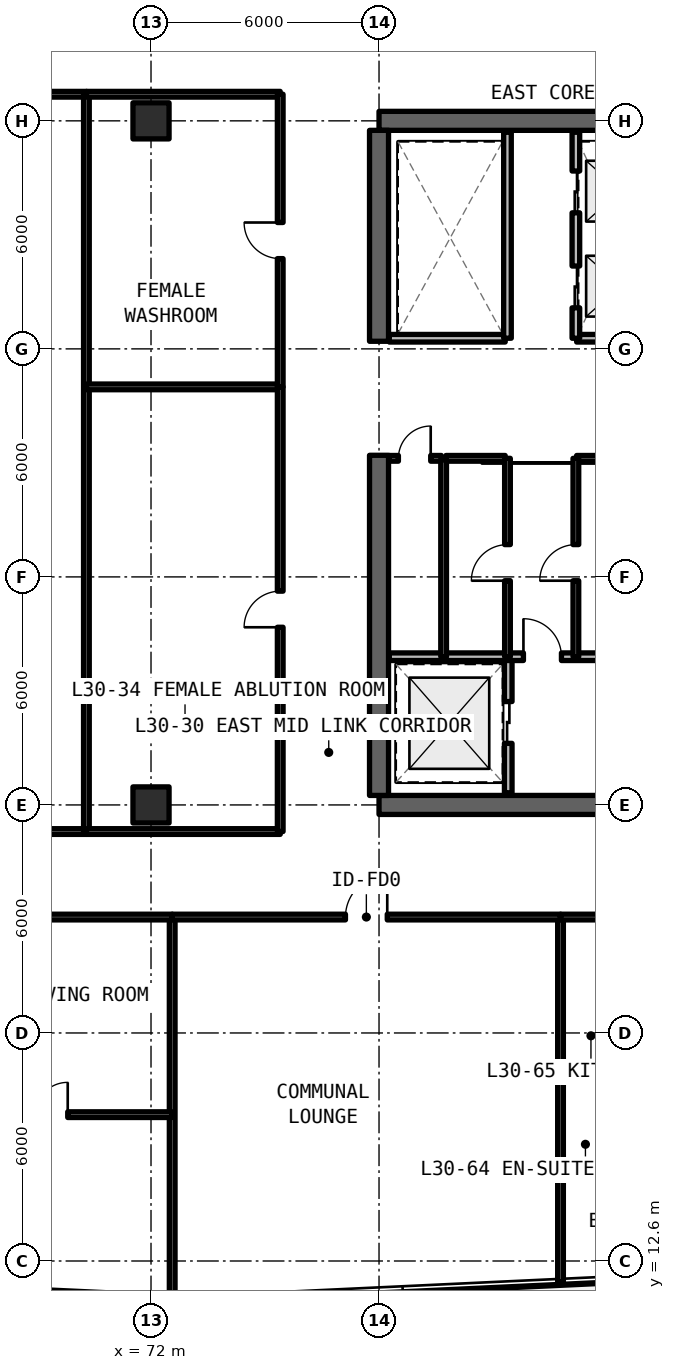
"""IFC4 building model, lengths in metres.
Left out: names, types, materials, properties, quantities, classifications, styles, units other than length and angle.
Written with IfcOpenShell. Run it as: python <this file> out.ifc"""

import sys

from ifc_helpers import new_model, si_unit, direction, frame, frame_2d, origin, origin_2d, place, context, subcontext, project, spatial, rectangle, extrude, element, fill, save


model = new_model("IFC4")
c1 = context("Model", 3, precision=1e-05, world=origin(), true_north=direction((0.0, 1.0)))
c2 = subcontext(c1, "Body", "Model", "MODEL_VIEW")
j1 = project(units=[si_unit("LENGTHUNIT", "METRE"), si_unit("PLANEANGLEUNIT", "RADIAN")], contexts=[c1])
p1 = place(None, origin())
s1 = spatial("IfcSite", under=j1, at=p1, CompositionType="ELEMENT")
p2 = place(p1, origin())
s2 = spatial("IfcBuilding", under=s1, at=p2, CompositionType="ELEMENT")
p3 = place(p2, frame((0.0, 0.0, 108.57)))
s3 = spatial("IfcBuildingStorey", under=s2, at=p3, CompositionType="ELEMENT", Elevation=108.57)
for number, where, z_axis, x_axis in (
    (1, (78.0, 24.6, 0.0), (0.0, 0.0, 1.0), (1.0, 0.0, 0.0)),
    (2, (90.0, 42.6, 0.0), (0.0, 0.0, 1.0), (-1.0, 0.0, 0.0)),
):
    element("IfcWall", number, at=place(p3, frame(where, z_axis=z_axis, x_axis=x_axis)), inside=s3, PredefinedType="SHEAR", context=c2, shape_type="SweptSolid", body=[
        extrude(rectangle(XDim=12.0, YDim=0.5, at=frame_2d((6.0, 0.0))), origin(), (0.0, 0.0, 1.0), 3.63),
    ])
p4 = place(p3, frame((78.0, 24.85, 0.0), z_axis=(0.0, 0.0, 1.0), x_axis=(0.0, 1.0, 0.0)))
e3 = element("IfcWall", 3, at=p4, inside=s3, PredefinedType="SHEAR", context=c2, shape_type="SweptSolid", body=[
    extrude(rectangle(XDim=8.95, YDim=0.5, at=frame_2d((4.475, 0.0))), origin(), (0.0, 0.0, 1.0), 3.63),
])
p5 = place(p3, frame((78.0, 36.8, 0.0), z_axis=(0.0, 0.0, 1.0), x_axis=(0.0, 1.0, 0.0)))
e4 = element("IfcWall", 4, at=p5, inside=s3, PredefinedType="SHEAR", context=c2, shape_type="SweptSolid", body=[
    extrude(rectangle(XDim=5.55, YDim=0.5, at=frame_2d((2.775, 0.0))), origin(), (0.0, 0.0, 1.0), 3.63),
])
for number, where, z_axis, x_axis in (
    (5, (72.0, 24.6, 0.0), (0.0, 0.0, 1.0), (1.0, 0.0, 0.0)),
    (6, (72.0, 42.6, 0.0), (0.0, 0.0, 1.0), (1.0, 0.0, 0.0)),
):
    element("IfcColumn", number, at=place(p3, frame(where, z_axis=z_axis, x_axis=x_axis)), inside=s3, PredefinedType="COLUMN", context=c2, shape_type="SweptSolid", body=[
        extrude(rectangle(XDim=0.95, YDim=0.95, at=origin_2d()), origin(), (0.0, 0.0, 1.0), 3.63),
    ])
p6 = place(p3, frame((81.4, 24.92, 0.0), z_axis=(0.0, 0.0, 1.0), x_axis=(0.0, 1.0, 0.0)))
e7 = element("IfcWall", 7, at=p6, inside=s3, PredefinedType="SOLIDWALL", context=c2, shape_type="SweptSolid", body=[
    extrude(rectangle(XDim=3.58, YDim=0.2, at=frame_2d((1.79, 0.0))), origin(), (0.0, 0.0, 1.0), 2.63),
])
p7 = place(p6, frame((1.3, 0.0, 0.0)))
e8 = element("IfcOpeningElement", 8, at=p7, cuts=e7, PredefinedType="OPENING", context=c2, shape_type="SweptSolid", body=[
    extrude(rectangle(XDim=1.1, YDim=2.2, at=frame_2d((0.55, 1.1))), frame((0.0, 0.11, 0.0), z_axis=(0.0, -1.0, 0.0), x_axis=(1.0, 0.0, 0.0)), (0.0, 0.0, 1.0), 0.22),
])
p8 = place(p3, frame((78.27, 28.5, 0.0), z_axis=(0.0, 0.0, 1.0), x_axis=(1.0, 0.0, 0.0)))
e9 = element("IfcWall", 9, at=p8, inside=s3, PredefinedType="SOLIDWALL", context=c2, shape_type="SweptSolid", body=[
    extrude(rectangle(XDim=7.51, YDim=0.2, at=frame_2d((3.755, 0.0))), origin(), (0.0, 0.0, 1.0), 2.63),
])
p9 = place(p8, frame((3.53, 0.0, 0.0)))
e10 = element("IfcOpeningElement", 10, at=p9, cuts=e9, PredefinedType="OPENING", context=c2, shape_type="SweptSolid", body=[
    extrude(rectangle(XDim=1.0, YDim=2.15, at=frame_2d((0.5, 1.075))), frame((0.0, 0.11, 0.0), z_axis=(0.0, -1.0, 0.0), x_axis=(1.0, 0.0, 0.0)), (0.0, 0.0, 1.0), 0.22),
])
p10 = place(p3, frame((83.2, 33.72, 0.0), z_axis=(0.0, 0.0, 1.0), x_axis=(1.0, 0.0, 0.0)))
e11 = element("IfcWall", 11, at=p10, inside=s3, PredefinedType="SOLIDWALL", context=c2, shape_type="SweptSolid", body=[
    extrude(rectangle(XDim=1.22, YDim=0.15, at=frame_2d((0.61, 0.0))), origin(), (0.0, 0.0, 1.0), 2.63),
])
p11 = place(p3, frame((83.18, 28.5, 0.0), z_axis=(0.0, 0.0, 1.0), x_axis=(0.0, 1.0, 0.0)))
e12 = element("IfcWall", 12, at=p11, inside=s3, PredefinedType="SOLIDWALL", context=c2, shape_type="SweptSolid", body=[
    extrude(rectangle(XDim=5.22, YDim=0.15, at=frame_2d((2.61, 0.0))), origin(), (0.0, 0.0, 1.0), 2.63),
])
p12 = place(p11, frame((2.0, 0.0, 0.0)))
e13 = element("IfcOpeningElement", 13, at=p12, cuts=e12, PredefinedType="OPENING", context=c2, shape_type="SweptSolid", body=[
    extrude(rectangle(XDim=0.95, YDim=2.15, at=frame_2d((0.475, 1.075))), frame((0.0, 0.085, 0.0), z_axis=(0.0, -1.0, 0.0), x_axis=(1.0, 0.0, 0.0)), (0.0, 0.0, 1.0), 0.17),
])
p13 = place(p3, frame((79.7, 28.5, 0.0), z_axis=(0.0, 0.0, 1.0), x_axis=(0.0, 1.0, 0.0)))
e14 = element("IfcWall", 14, at=p13, inside=s3, PredefinedType="SOLIDWALL", context=c2, shape_type="SweptSolid", body=[
    extrude(rectangle(XDim=5.22, YDim=0.15, at=frame_2d((2.61, 0.0))), origin(), (0.0, 0.0, 1.0), 2.63),
])
p14 = place(p3, frame((79.76, 33.72, 0.0), z_axis=(0.0, 0.0, 1.0), x_axis=(1.0, 0.0, 0.0)))
e15 = element("IfcWall", 15, at=p14, inside=s3, PredefinedType="SOLIDWALL", context=c2, shape_type="SweptSolid", body=[
    extrude(rectangle(XDim=1.56, YDim=0.15, at=frame_2d((0.78, 0.0))), origin(), (0.0, 0.0, 1.0), 2.63),
])
p15 = place(p3, frame((78.27, 33.72, 0.0), z_axis=(0.0, 0.0, 1.0), x_axis=(1.0, 0.0, 0.0)))
e16 = element("IfcWall", 16, at=p15, inside=s3, PredefinedType="SOLIDWALL", context=c2, shape_type="SweptSolid", body=[
    extrude(rectangle(XDim=1.37, YDim=0.15, at=frame_2d((0.685, 0.0))), origin(), (0.0, 0.0, 1.0), 2.63),
])
p16 = place(p15, frame((0.24, 0.0, 0.0)))
e17 = element("IfcOpeningElement", 17, at=p16, cuts=e16, PredefinedType="OPENING", context=c2, shape_type="SweptSolid", body=[
    extrude(rectangle(XDim=0.85, YDim=2.1, at=frame_2d((0.425, 1.05))), frame((0.0, 0.085, 0.0), z_axis=(0.0, -1.0, 0.0), x_axis=(1.0, 0.0, 0.0)), (0.0, 0.0, 1.0), 0.17),
])
p17 = place(p3, frame((81.38, 28.5, 0.0), z_axis=(0.0, 0.0, 1.0), x_axis=(0.0, 1.0, 0.0)))
e18 = element("IfcWall", 18, at=p17, inside=s3, PredefinedType="SOLIDWALL", context=c2, shape_type="SweptSolid", body=[
    extrude(rectangle(XDim=5.22, YDim=0.15, at=frame_2d((2.61, 0.0))), origin(), (0.0, 0.0, 1.0), 2.63),
])
p18 = place(p17, frame((2.0, 0.0, 0.0)))
e19 = element("IfcOpeningElement", 19, at=p18, cuts=e18, PredefinedType="OPENING", context=c2, shape_type="SweptSolid", body=[
    extrude(rectangle(XDim=0.95, YDim=2.15, at=frame_2d((0.475, 1.075))), frame((0.0, 0.085, 0.0), z_axis=(0.0, -1.0, 0.0), x_axis=(1.0, 0.0, 0.0)), (0.0, 0.0, 1.0), 0.17),
])
p19 = place(p3, frame((83.2, 36.88, 0.0), z_axis=(0.0, 0.0, 1.0), x_axis=(1.0, 0.0, 0.0)))
e20 = element("IfcWall", 20, at=p19, inside=s3, PredefinedType="SOLIDWALL", context=c2, shape_type="SweptSolid", body=[
    extrude(rectangle(XDim=2.58, YDim=0.2, at=frame_2d((1.29, 0.0))), origin(), (0.0, 0.0, 1.0), 2.63),
])
p20 = place(p3, frame((83.18, 36.88, 0.0), z_axis=(0.0, 0.0, 1.0), x_axis=(0.0, 1.0, 0.0)))
e21 = element("IfcWall", 21, at=p20, inside=s3, PredefinedType="SOLIDWALL", context=c2, shape_type="SweptSolid", body=[
    extrude(rectangle(XDim=5.42, YDim=0.2, at=frame_2d((2.71, 0.0))), origin(), (0.0, 0.0, 1.0), 2.63),
])
p21 = place(p20, frame((0.8, 0.0, 0.0)))
e22 = element("IfcOpeningElement", 22, at=p21, cuts=e21, PredefinedType="OPENING", context=c2, shape_type="SweptSolid", body=[
    extrude(rectangle(XDim=1.1, YDim=2.2, at=frame_2d((0.55, 1.1))), frame((0.0, 0.11, 0.0), z_axis=(0.0, -1.0, 0.0), x_axis=(1.0, 0.0, 0.0)), (0.0, 0.0, 1.0), 0.22),
])
p22 = place(p20, frame((3.3, 0.0, 0.0)))
e23 = element("IfcOpeningElement", 23, at=p22, cuts=e21, PredefinedType="OPENING", context=c2, shape_type="SweptSolid", body=[
    extrude(rectangle(XDim=1.1, YDim=2.2, at=frame_2d((0.55, 1.1))), frame((0.0, 0.11, 0.0), z_axis=(0.0, -1.0, 0.0), x_axis=(1.0, 0.0, 0.0)), (0.0, 0.0, 1.0), 0.22),
])
p23 = place(p3, frame((78.27, 36.88, 0.0), z_axis=(0.0, 0.0, 1.0), x_axis=(1.0, 0.0, 0.0)))
e24 = element("IfcWall", 24, at=p23, inside=s3, PredefinedType="SOLIDWALL", context=c2, shape_type="SweptSolid", body=[
    extrude(rectangle(XDim=3.05, YDim=0.2, at=frame_2d((1.525, 0.0))), origin(), (0.0, 0.0, 1.0), 2.63),
])
p24 = place(p3, frame((81.38, 36.88, 0.0), z_axis=(0.0, 0.0, 1.0), x_axis=(0.0, 1.0, 0.0)))
e25 = element("IfcWall", 25, at=p24, inside=s3, PredefinedType="SOLIDWALL", context=c2, shape_type="SweptSolid", body=[
    extrude(rectangle(XDim=5.42, YDim=0.2, at=frame_2d((2.71, 0.0))), origin(), (0.0, 0.0, 1.0), 2.63),
])
p25 = place(p3, frame((42.9, 23.9, 0.0), z_axis=(0.0, 0.0, 1.0), x_axis=(1.0, 0.0, 0.0)))
e26 = element("IfcWall", 26, at=p25, inside=s3, PredefinedType="SOLIDWALL", context=c2, shape_type="SweptSolid", body=[
    extrude(rectangle(XDim=27.4, YDim=0.15, at=frame_2d((13.7, 0.0))), origin(), (0.0, 0.0, 1.0), 2.63),
])
p26 = place(p25, frame((13.0, 0.0, 0.0)))
e27 = element("IfcOpeningElement", 27, at=p26, cuts=e26, PredefinedType="OPENING", context=c2, shape_type="SweptSolid", body=[
    extrude(rectangle(XDim=1.4, YDim=2.15, at=frame_2d((0.7, 1.075))), frame((0.0, 0.085, 0.0), z_axis=(0.0, -1.0, 0.0), x_axis=(1.0, 0.0, 0.0)), (0.0, 0.0, 1.0), 0.17),
])
p27 = place(p3, frame((42.9, 43.3, 0.0), z_axis=(0.0, 0.0, 1.0), x_axis=(1.0, 0.0, 0.0)))
e28 = element("IfcWall", 28, at=p27, inside=s3, PredefinedType="SOLIDWALL", context=c2, shape_type="SweptSolid", body=[
    extrude(rectangle(XDim=27.4, YDim=0.15, at=frame_2d((13.7, 0.0))), origin(), (0.0, 0.0, 1.0), 2.63),
])
p28 = place(p3, frame((70.3, 23.9, 0.0), z_axis=(0.0, 0.0, 1.0), x_axis=(0.0, 1.0, 0.0)))
e29 = element("IfcWall", 29, at=p28, inside=s3, PredefinedType="SOLIDWALL", context=c2, shape_type="SweptSolid", body=[
    extrude(rectangle(XDim=19.4, YDim=0.15, at=frame_2d((9.7, 0.0))), origin(), (0.0, 0.0, 1.0), 2.63),
])
for number, where, z_axis, x_axis in (
    (30, (70.3, 23.9, 0.0), (0.0, 0.0, 1.0), (1.0, 0.0, 0.0)),
    (31, (70.3, 35.6, 0.0), (0.0, 0.0, 1.0), (1.0, 0.0, 0.0)),
):
    element("IfcWall", number, at=place(p3, frame(where, z_axis=z_axis, x_axis=x_axis)), inside=s3, PredefinedType="SOLIDWALL", context=c2, shape_type="SweptSolid", body=[
        extrude(rectangle(XDim=5.1, YDim=0.15, at=frame_2d((2.55, 0.0))), origin(), (0.0, 0.0, 1.0), 2.63),
    ])
p29 = place(p3, frame((75.4, 23.9, 0.0), z_axis=(0.0, 0.0, 1.0), x_axis=(0.0, 1.0, 0.0)))
e32 = element("IfcWall", 32, at=p29, inside=s3, PredefinedType="SOLIDWALL", context=c2, shape_type="SweptSolid", body=[
    extrude(rectangle(XDim=11.7, YDim=0.15, at=frame_2d((5.85, 0.0))), origin(), (0.0, 0.0, 1.0), 2.63),
])
p30 = place(p29, frame((5.375, 0.0, 0.0)))
e33 = element("IfcOpeningElement", 33, at=p30, cuts=e32, PredefinedType="OPENING", context=c2, shape_type="SweptSolid", body=[
    extrude(rectangle(XDim=0.95, YDim=2.15, at=frame_2d((0.475, 1.075))), frame((0.0, 0.085, 0.0), z_axis=(0.0, -1.0, 0.0), x_axis=(1.0, 0.0, 0.0)), (0.0, 0.0, 1.0), 0.17),
])
p31 = place(p3, frame((70.3, 43.3, 0.0), z_axis=(0.0, 0.0, 1.0), x_axis=(1.0, 0.0, 0.0)))
e34 = element("IfcWall", 34, at=p31, inside=s3, PredefinedType="SOLIDWALL", context=c2, shape_type="SweptSolid", body=[
    extrude(rectangle(XDim=5.1, YDim=0.15, at=frame_2d((2.55, 0.0))), origin(), (0.0, 0.0, 1.0), 2.63),
])
p32 = place(p3, frame((75.4, 35.6, 0.0), z_axis=(0.0, 0.0, 1.0), x_axis=(0.0, 1.0, 0.0)))
e35 = element("IfcWall", 35, at=p32, inside=s3, PredefinedType="SOLIDWALL", context=c2, shape_type="SweptSolid", body=[
    extrude(rectangle(XDim=7.7, YDim=0.15, at=frame_2d((3.85, 0.0))), origin(), (0.0, 0.0, 1.0), 2.63),
])
p33 = place(p32, frame((3.375, 0.0, 0.0)))
e36 = element("IfcOpeningElement", 36, at=p33, cuts=e35, PredefinedType="OPENING", context=c2, shape_type="SweptSolid", body=[
    extrude(rectangle(XDim=0.95, YDim=2.15, at=frame_2d((0.475, 1.075))), frame((0.0, 0.085, 0.0), z_axis=(0.0, -1.0, 0.0), x_axis=(1.0, 0.0, 0.0)), (0.0, 0.0, 1.0), 0.17),
])
p34 = place(p3, frame((72.557, 11.64, 0.0), z_axis=(0.0, 0.0, 1.0), x_axis=(0.0, 1.0, 0.0)))
e37 = element("IfcWall", 37, at=p34, inside=s3, PredefinedType="SOLIDWALL", context=c2, shape_type="SweptSolid", body=[
    extrude(rectangle(XDim=10.01, YDim=0.15, at=frame_2d((5.005, 0.0))), origin(), (0.0, 0.0, 1.0), 2.63),
])
p35 = place(p3, frame((59.333, 16.451, 0.0), z_axis=(0.0, 0.0, 1.0), x_axis=(1.0, 0.0, 0.0)))
e38 = element("IfcWall", 38, at=p35, inside=s3, PredefinedType="PARTITIONING", context=c2, shape_type="SweptSolid", body=[
    extrude(rectangle(XDim=13.224, YDim=0.15, at=frame_2d((6.612, 0.0))), origin(), (0.0, 0.0, 1.0), 2.63),
])
p36 = place(p35, frame((4.188, 0.0, 0.0)))
e39 = element("IfcOpeningElement", 39, at=p36, cuts=e38, PredefinedType="OPENING", context=c2, shape_type="SweptSolid", body=[
    extrude(rectangle(XDim=0.85, YDim=2.1, at=frame_2d((0.425, 1.05))), frame((0.0, 0.085, 0.0), z_axis=(0.0, -1.0, 0.0), x_axis=(1.0, 0.0, 0.0)), (0.0, 0.0, 1.0), 0.17),
])
p37 = place(p35, frame((9.625, 0.0, 0.0)))
e40 = element("IfcOpeningElement", 40, at=p37, cuts=e38, PredefinedType="OPENING", context=c2, shape_type="SweptSolid", body=[
    extrude(rectangle(XDim=0.85, YDim=2.1, at=frame_2d((0.425, 1.05))), frame((0.0, 0.085, 0.0), z_axis=(0.0, -1.0, 0.0), x_axis=(1.0, 0.0, 0.0)), (0.0, 0.0, 1.0), 0.17),
])
p38 = place(p3, frame((59.333, 21.65, 0.0), z_axis=(0.0, 0.0, 1.0), x_axis=(1.0, 0.0, 0.0)))
e41 = element("IfcWall", 41, at=p38, inside=s3, PredefinedType="SOLIDWALL", context=c2, shape_type="SweptSolid", body=[
    extrude(rectangle(XDim=13.224, YDim=0.15, at=frame_2d((6.612, 0.0))), origin(), (0.0, 0.0, 1.0), 2.63),
])
p39 = place(p38, frame((7.352, 0.0, 0.0)))
e42 = element("IfcOpeningElement", 42, at=p39, cuts=e41, PredefinedType="OPENING", context=c2, shape_type="SweptSolid", body=[
    extrude(rectangle(XDim=0.95, YDim=2.15, at=frame_2d((0.475, 1.075))), frame((0.0, 0.085, 0.0), z_axis=(0.0, -1.0, 0.0), x_axis=(1.0, 0.0, 0.0)), (0.0, 0.0, 1.0), 0.17),
])
p40 = place(p3, frame((82.776, 12.05, 0.0), z_axis=(0.0, 0.0, 1.0), x_axis=(0.0, 1.0, 0.0)))
e43 = element("IfcWall", 43, at=p40, inside=s3, PredefinedType="SOLIDWALL", context=c2, shape_type="SweptSolid", body=[
    extrude(rectangle(XDim=9.6, YDim=0.15, at=frame_2d((4.8, 0.0))), origin(), (0.0, 0.0, 1.0), 2.63),
])
p41 = place(p3, frame((72.557, 21.65, 0.0), z_axis=(0.0, 0.0, 1.0), x_axis=(1.0, 0.0, 0.0)))
e44 = element("IfcWall", 44, at=p41, inside=s3, PredefinedType="SOLIDWALL", context=c2, shape_type="SweptSolid", body=[
    extrude(rectangle(XDim=10.219, YDim=0.15, at=frame_2d((5.109, 0.0))), origin(), (0.0, 0.0, 1.0), 2.63),
])
p42 = place(p41, frame((4.559, 0.0, 0.0)))
e45 = element("IfcOpeningElement", 45, at=p42, cuts=e44, PredefinedType="OPENING", context=c2, shape_type="SweptSolid", body=[
    extrude(rectangle(XDim=1.1, YDim=2.15, at=frame_2d((0.55, 1.075))), frame((0.0, 0.085, 0.0), z_axis=(0.0, -1.0, 0.0), x_axis=(1.0, 0.0, 0.0)), (0.0, 0.0, 1.0), 0.17),
])
p43 = place(p3, frame((82.776, 17.727, 0.0), z_axis=(0.0, 0.0, 1.0), x_axis=(1.0, 0.0, 0.0)))
e46 = element("IfcWall", 46, at=p43, inside=s3, PredefinedType="PARTITIONING", context=c2, shape_type="SweptSolid", body=[
    extrude(rectangle(XDim=2.35, YDim=0.15, at=frame_2d((1.175, 0.0))), origin(), (0.0, 0.0, 1.0), 2.63),
])
p44 = place(p3, frame((82.776, 15.0, 0.0), z_axis=(0.0, 0.0, 1.0), x_axis=(1.0, 0.0, 0.0)))
e47 = element("IfcWall", 47, at=p44, inside=s3, PredefinedType="PARTITIONING", context=c2, shape_type="SweptSolid", body=[
    extrude(rectangle(XDim=13.224, YDim=0.15, at=frame_2d((6.612, 0.0))), origin(), (0.0, 0.0, 1.0), 2.63),
])
p45 = place(p44, frame((4.188, 0.0, 0.0)))
e48 = element("IfcOpeningElement", 48, at=p45, cuts=e47, PredefinedType="OPENING", context=c2, shape_type="SweptSolid", body=[
    extrude(rectangle(XDim=0.85, YDim=2.1, at=frame_2d((0.425, 1.05))), frame((0.0, 0.085, 0.0), z_axis=(0.0, -1.0, 0.0), x_axis=(1.0, 0.0, 0.0)), (0.0, 0.0, 1.0), 0.17),
])
p46 = place(p44, frame((9.625, 0.0, 0.0)))
e49 = element("IfcOpeningElement", 49, at=p46, cuts=e47, PredefinedType="OPENING", context=c2, shape_type="SweptSolid", body=[
    extrude(rectangle(XDim=0.85, YDim=2.1, at=frame_2d((0.425, 1.05))), frame((0.0, 0.085, 0.0), z_axis=(0.0, -1.0, 0.0), x_axis=(1.0, 0.0, 0.0)), (0.0, 0.0, 1.0), 0.17),
])
p47 = place(p3, frame((82.776, 21.65, 0.0), z_axis=(0.0, 0.0, 1.0), x_axis=(1.0, 0.0, 0.0)))
e50 = element("IfcWall", 50, at=p47, inside=s3, PredefinedType="SOLIDWALL", context=c2, shape_type="SweptSolid", body=[
    extrude(rectangle(XDim=13.224, YDim=0.15, at=frame_2d((6.612, 0.0))), origin(), (0.0, 0.0, 1.0), 2.63),
])
p48 = place(p47, frame((4.658, 0.0, 0.0)))
e51 = element("IfcOpeningElement", 51, at=p48, cuts=e50, PredefinedType="OPENING", context=c2, shape_type="SweptSolid", body=[
    extrude(rectangle(XDim=0.95, YDim=2.15, at=frame_2d((0.475, 1.075))), frame((0.0, 0.085, 0.0), z_axis=(0.0, -1.0, 0.0), x_axis=(1.0, 0.0, 0.0)), (0.0, 0.0, 1.0), 0.17),
])
p49 = place(p7, origin())
e52 = element("IfcDoor", 52, at=p49, inside=s3, OperationType="SLIDING_TO_LEFT", PredefinedType="DOOR", context=c2, shape_type="SweptSolid", body=[
    extrude(rectangle(XDim=1.1, YDim=2.2, at=frame_2d((0.55, 1.1))), frame((0.0, 0.025, 0.0), z_axis=(0.0, -1.0, 0.0), x_axis=(1.0, 0.0, 0.0)), (0.0, 0.0, 1.0), 0.05),
])
fill(e8, e52)
p50 = place(p9, origin())
e53 = element("IfcDoor", 53, at=p50, inside=s3, OperationType="SINGLE_SWING_LEFT", PredefinedType="DOOR", context=c2, shape_type="SweptSolid", body=[
    extrude(rectangle(XDim=1.0, YDim=2.15, at=frame_2d((0.5, 1.075))), frame((0.0, 0.025, 0.0), z_axis=(0.0, -1.0, 0.0), x_axis=(1.0, 0.0, 0.0)), (0.0, 0.0, 1.0), 0.05),
])
fill(e10, e53)
p51 = place(p12, origin())
e54 = element("IfcDoor", 54, at=p51, inside=s3, OperationType="SINGLE_SWING_LEFT", PredefinedType="DOOR", context=c2, shape_type="SweptSolid", body=[
    extrude(rectangle(XDim=0.95, YDim=2.15, at=frame_2d((0.475, 1.075))), frame((0.0, 0.025, 0.0), z_axis=(0.0, -1.0, 0.0), x_axis=(1.0, 0.0, 0.0)), (0.0, 0.0, 1.0), 0.05),
])
fill(e13, e54)
p52 = place(p16, origin())
e55 = element("IfcDoor", 55, at=p52, inside=s3, OperationType="SINGLE_SWING_RIGHT", PredefinedType="DOOR", context=c2, shape_type="SweptSolid", body=[
    extrude(rectangle(XDim=0.85, YDim=2.1, at=frame_2d((0.425, 1.05))), frame((0.0, 0.025, 0.0), z_axis=(0.0, -1.0, 0.0), x_axis=(1.0, 0.0, 0.0)), (0.0, 0.0, 1.0), 0.05),
])
fill(e17, e55)
p53 = place(p18, origin())
e56 = element("IfcDoor", 56, at=p53, inside=s3, OperationType="SINGLE_SWING_LEFT", PredefinedType="DOOR", context=c2, shape_type="SweptSolid", body=[
    extrude(rectangle(XDim=0.95, YDim=2.15, at=frame_2d((0.475, 1.075))), frame((0.0, 0.025, 0.0), z_axis=(0.0, -1.0, 0.0), x_axis=(1.0, 0.0, 0.0)), (0.0, 0.0, 1.0), 0.05),
])
fill(e19, e56)
p54 = place(p21, origin())
e57 = element("IfcDoor", 57, at=p54, inside=s3, OperationType="SLIDING_TO_LEFT", PredefinedType="DOOR", context=c2, shape_type="SweptSolid", body=[
    extrude(rectangle(XDim=1.1, YDim=2.2, at=frame_2d((0.55, 1.1))), frame((0.0, 0.025, 0.0), z_axis=(0.0, -1.0, 0.0), x_axis=(1.0, 0.0, 0.0)), (0.0, 0.0, 1.0), 0.05),
])
fill(e22, e57)
p55 = place(p22, origin())
e58 = element("IfcDoor", 58, at=p55, inside=s3, OperationType="SLIDING_TO_RIGHT", PredefinedType="DOOR", context=c2, shape_type="SweptSolid", body=[
    extrude(rectangle(XDim=1.1, YDim=2.2, at=frame_2d((0.55, 1.1))), frame((0.0, 0.025, 0.0), z_axis=(0.0, -1.0, 0.0), x_axis=(1.0, 0.0, 0.0)), (0.0, 0.0, 1.0), 0.05),
])
fill(e23, e58)
p56 = place(p30, origin())
e59 = element("IfcDoor", 59, at=p56, inside=s3, OperationType="SINGLE_SWING_LEFT", PredefinedType="DOOR", context=c2, shape_type="SweptSolid", body=[
    extrude(rectangle(XDim=0.95, YDim=2.15, at=frame_2d((0.475, 1.075))), frame((0.0, 0.025, 0.0), z_axis=(0.0, -1.0, 0.0), x_axis=(1.0, 0.0, 0.0)), (0.0, 0.0, 1.0), 0.05),
])
fill(e33, e59)
p57 = place(p33, origin())
e60 = element("IfcDoor", 60, at=p57, inside=s3, OperationType="SINGLE_SWING_RIGHT", PredefinedType="DOOR", context=c2, shape_type="SweptSolid", body=[
    extrude(rectangle(XDim=0.95, YDim=2.15, at=frame_2d((0.475, 1.075))), frame((0.0, 0.025, 0.0), z_axis=(0.0, -1.0, 0.0), x_axis=(1.0, 0.0, 0.0)), (0.0, 0.0, 1.0), 0.05),
])
fill(e36, e60)
p58 = place(p37, origin())
e61 = element("IfcDoor", 61, at=p58, inside=s3, OperationType="SINGLE_SWING_RIGHT", PredefinedType="DOOR", context=c2, shape_type="SweptSolid", body=[
    extrude(rectangle(XDim=0.85, YDim=2.1, at=frame_2d((0.425, 1.05))), frame((0.0, 0.025, 0.0), z_axis=(0.0, -1.0, 0.0), x_axis=(1.0, 0.0, 0.0)), (0.0, 0.0, 1.0), 0.05),
])
fill(e40, e61)
p59 = place(p42, origin())
e62 = element("IfcDoor", 62, at=p59, inside=s3, OperationType="SINGLE_SWING_RIGHT", PredefinedType="DOOR", context=c2, shape_type="SweptSolid", body=[
    extrude(rectangle(XDim=1.1, YDim=2.15, at=frame_2d((0.55, 1.075))), frame((0.0, 0.025, 0.0), z_axis=(0.0, -1.0, 0.0), x_axis=(1.0, 0.0, 0.0)), (0.0, 0.0, 1.0), 0.05),
])
fill(e45, e62)
save(model, sys.argv[1])
